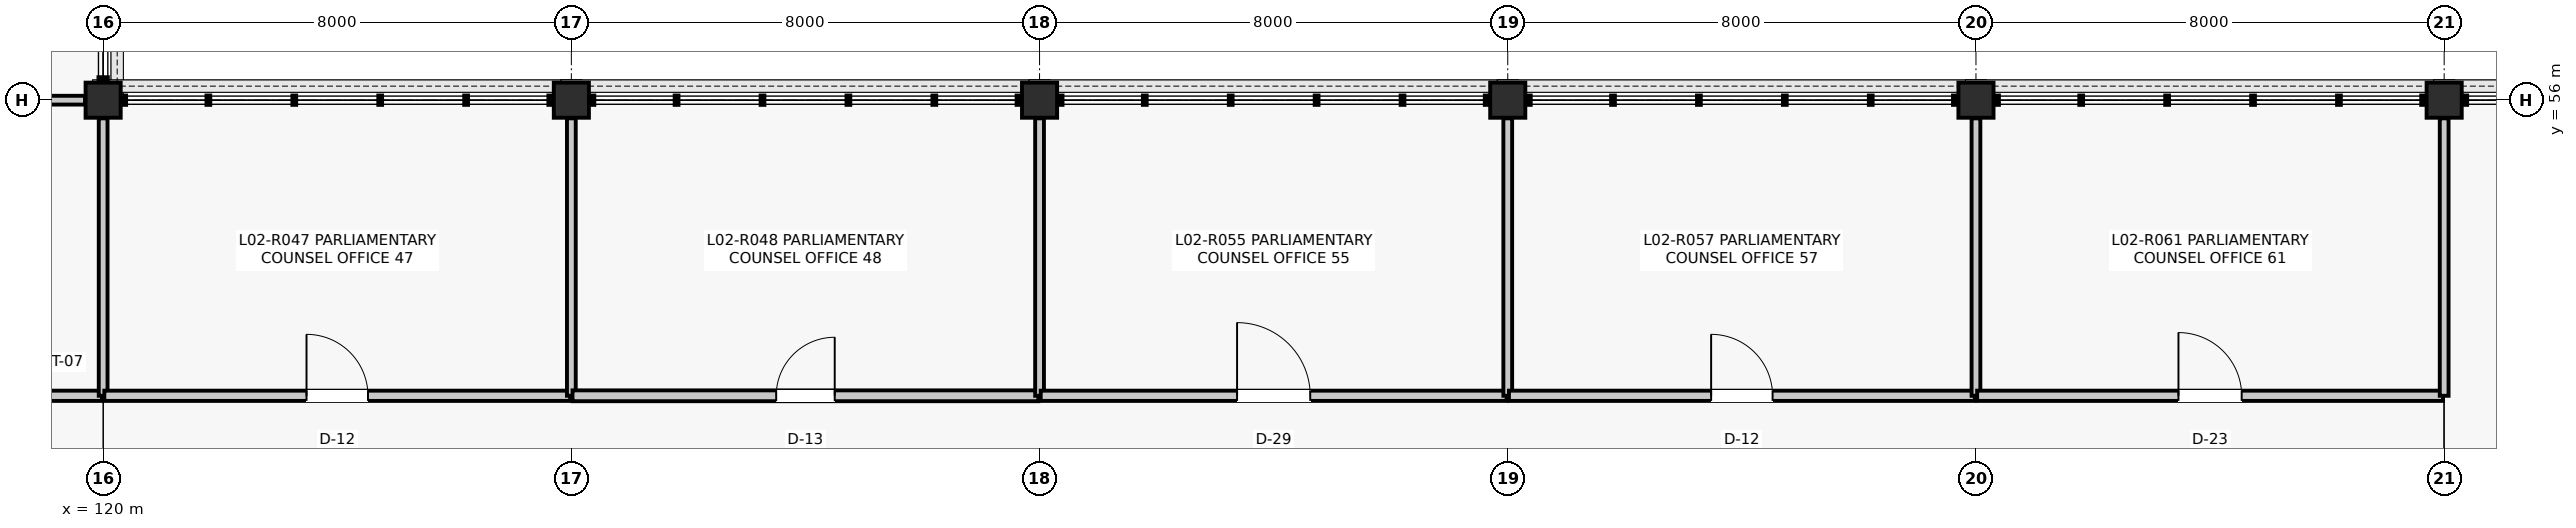
"""IFC4 building model, lengths in metres.
Left out: names, types, materials, properties, quantities, classifications, styles, units other than length and angle.
Written with IfcOpenShell. Run it as: python <this file> out.ifc"""

import sys

from ifc_helpers import new_model, si_unit, direction, frame, frame_2d, origin, origin_2d, place, context, subcontext, project, spatial, rectangle, extrude, element, fill, save


model = new_model("IFC4")
c1 = context("Model", 3, precision=1e-05, world=origin(), true_north=direction((0.0, 1.0)))
c2 = subcontext(c1, "Body", "Model", "MODEL_VIEW")
j1 = project(units=[si_unit("LENGTHUNIT", "METRE"), si_unit("PLANEANGLEUNIT", "RADIAN")], contexts=[c1])
p1 = place(None, origin())
s1 = spatial("IfcSite", under=j1, at=p1, CompositionType="ELEMENT")
p2 = place(p1, origin())
s2 = spatial("IfcBuilding", under=s1, at=p2, CompositionType="ELEMENT")
p3 = place(p2, frame((0.0, 0.0, 9.9)))
s3 = spatial("IfcBuildingStorey", under=s2, at=p3, CompositionType="ELEMENT", Elevation=9.9)
for number, where, z_axis, x_axis in (
    (1, (120.0, 56.0, 0.0), (0.0, 0.0, 1.0), (1.0, 0.0, 0.0)),
    (2, (128.0, 56.0, 0.0), (0.0, 0.0, 1.0), (1.0, 0.0, 0.0)),
    (3, (136.0, 56.0, 0.0), (0.0, 0.0, 1.0), (1.0, 0.0, 0.0)),
    (4, (144.0, 56.0, 0.0), (0.0, 0.0, 1.0), (1.0, 0.0, 0.0)),
    (5, (152.0, 56.0, 0.0), (0.0, 0.0, 1.0), (1.0, 0.0, 0.0)),
    (6, (160.0, 56.0, 0.0), (0.0, 0.0, 1.0), (1.0, 0.0, 0.0)),
):
    element("IfcColumn", number, at=place(p3, frame(where, z_axis=z_axis, x_axis=x_axis)), inside=s3, PredefinedType="COLUMN", context=c2, shape_type="SweptSolid", body=[
        extrude(rectangle(XDim=0.6, YDim=0.6, at=origin_2d()), origin(), (0.0, 0.0, 1.0), 3.96),
    ])
p4 = place(p3, frame((114.9, 50.95, 0.0), z_axis=(0.0, 0.0, 1.0), x_axis=(1.0, 0.0, 0.0)))
e7 = element("IfcWall", 7, at=p4, inside=s3, PredefinedType="PARTITIONING", context=c2, shape_type="SweptSolid", body=[
    extrude(rectangle(XDim=5.08, YDim=0.175, at=frame_2d((2.54, 0.0))), origin(), (0.0, 0.0, 1.0), 3.227),
])
p5 = place(p4, frame((1.915, 0.0, 0.0)))
e8 = element("IfcOpeningElement", 8, at=p5, cuts=e7, PredefinedType="OPENING", context=c2, shape_type="SweptSolid", body=[
    extrude(rectangle(XDim=1.25, YDim=2.18, at=frame_2d((0.625, 1.09))), frame((0.0, 0.097, 0.0), z_axis=(0.0, -1.0, 0.0), x_axis=(1.0, 0.0, 0.0)), (0.0, 0.0, 1.0), 0.195),
])
p6 = place(p3, frame((114.95, 56.0, 0.0), z_axis=(0.0, 0.0, 1.0), x_axis=(1.0, 0.0, 0.0)))
e9 = element("IfcWall", 9, at=p6, inside=s3, PredefinedType="PARTITIONING", context=c2, shape_type="SweptSolid", body=[
    extrude(rectangle(XDim=4.74, YDim=0.15, at=frame_2d((2.37, 0.0))), origin(), (0.0, 0.0, 1.0), 3.157),
])
p7 = place(p3, frame((120.0, 50.95, 0.0), z_axis=(0.0, 0.0, 1.0), x_axis=(0.0, 1.0, 0.0)))
e10 = element("IfcWall", 10, at=p7, inside=s3, PredefinedType="PARTITIONING", context=c2, shape_type="SweptSolid", body=[
    extrude(rectangle(XDim=4.74, YDim=0.15, at=frame_2d((2.37, 0.0))), origin(), (0.0, 0.0, 1.0), 3.227),
])
p8 = place(p3, frame((120.02, 50.95, 0.0), z_axis=(0.0, 0.0, 1.0), x_axis=(1.0, 0.0, 0.0)))
e11 = element("IfcWall", 11, at=p8, inside=s3, PredefinedType="PARTITIONING", context=c2, shape_type="SweptSolid", body=[
    extrude(rectangle(XDim=7.96, YDim=0.175, at=frame_2d((3.98, 0.0))), origin(), (0.0, 0.0, 1.0), 3.151),
])
p9 = place(p8, frame((3.455, 0.0, 0.0)))
e12 = element("IfcOpeningElement", 12, at=p9, cuts=e11, PredefinedType="OPENING", context=c2, shape_type="SweptSolid", body=[
    extrude(rectangle(XDim=1.05, YDim=2.15, at=frame_2d((0.525, 1.075))), frame((0.0, 0.097, 0.0), z_axis=(0.0, -1.0, 0.0), x_axis=(1.0, 0.0, 0.0)), (0.0, 0.0, 1.0), 0.195),
])
p10 = place(p3, frame((128.0, 50.95, 0.0), z_axis=(0.0, 0.0, 1.0), x_axis=(0.0, 1.0, 0.0)))
e13 = element("IfcWall", 13, at=p10, inside=s3, PredefinedType="PARTITIONING", context=c2, shape_type="SweptSolid", body=[
    extrude(rectangle(XDim=4.74, YDim=0.15, at=frame_2d((2.37, 0.0))), origin(), (0.0, 0.0, 1.0), 3.151),
])
p11 = place(p3, frame((128.02, 50.95, 0.0), z_axis=(0.0, 0.0, 1.0), x_axis=(1.0, 0.0, 0.0)))
e14 = element("IfcWall", 14, at=p11, inside=s3, PredefinedType="PARTITIONING", context=c2, shape_type="SweptSolid", body=[
    extrude(rectangle(XDim=7.96, YDim=0.185, at=frame_2d((3.98, 0.0))), origin(), (0.0, 0.0, 1.0), 3.151),
])
p12 = place(p11, frame((3.48, 0.0, 0.0)))
e15 = element("IfcOpeningElement", 15, at=p12, cuts=e14, PredefinedType="OPENING", context=c2, shape_type="SweptSolid", body=[
    extrude(rectangle(XDim=1.0, YDim=2.15, at=frame_2d((0.5, 1.075))), frame((0.0, 0.103, 0.0), z_axis=(0.0, -1.0, 0.0), x_axis=(1.0, 0.0, 0.0)), (0.0, 0.0, 1.0), 0.205),
])
p13 = place(p3, frame((136.0, 50.95, 0.0), z_axis=(0.0, 0.0, 1.0), x_axis=(0.0, 1.0, 0.0)))
e16 = element("IfcWall", 16, at=p13, inside=s3, PredefinedType="PARTITIONING", context=c2, shape_type="SweptSolid", body=[
    extrude(rectangle(XDim=4.74, YDim=0.15, at=frame_2d((2.37, 0.0))), origin(), (0.0, 0.0, 1.0), 3.221),
])
p14 = place(p3, frame((136.02, 50.95, 0.0), z_axis=(0.0, 0.0, 1.0), x_axis=(1.0, 0.0, 0.0)))
e17 = element("IfcWall", 17, at=p14, inside=s3, PredefinedType="PARTITIONING", context=c2, shape_type="SweptSolid", body=[
    extrude(rectangle(XDim=7.96, YDim=0.175, at=frame_2d((3.98, 0.0))), origin(), (0.0, 0.0, 1.0), 3.157),
])
p15 = place(p14, frame((3.355, 0.0, 0.0)))
e18 = element("IfcOpeningElement", 18, at=p15, cuts=e17, PredefinedType="OPENING", context=c2, shape_type="SweptSolid", body=[
    extrude(rectangle(XDim=1.25, YDim=2.18, at=frame_2d((0.625, 1.09))), frame((0.0, 0.097, 0.0), z_axis=(0.0, -1.0, 0.0), x_axis=(1.0, 0.0, 0.0)), (0.0, 0.0, 1.0), 0.195),
])
p16 = place(p3, frame((144.0, 50.95, 0.0), z_axis=(0.0, 0.0, 1.0), x_axis=(0.0, 1.0, 0.0)))
e19 = element("IfcWall", 19, at=p16, inside=s3, PredefinedType="PARTITIONING", context=c2, shape_type="SweptSolid", body=[
    extrude(rectangle(XDim=4.74, YDim=0.15, at=frame_2d((2.37, 0.0))), origin(), (0.0, 0.0, 1.0), 3.157),
])
p17 = place(p3, frame((144.02, 50.95, 0.0), z_axis=(0.0, 0.0, 1.0), x_axis=(1.0, 0.0, 0.0)))
e20 = element("IfcWall", 20, at=p17, inside=s3, PredefinedType="PARTITIONING", context=c2, shape_type="SweptSolid", body=[
    extrude(rectangle(XDim=7.96, YDim=0.175, at=frame_2d((3.98, 0.0))), origin(), (0.0, 0.0, 1.0), 3.157),
])
p18 = place(p17, frame((3.455, 0.0, 0.0)))
e21 = element("IfcOpeningElement", 21, at=p18, cuts=e20, PredefinedType="OPENING", context=c2, shape_type="SweptSolid", body=[
    extrude(rectangle(XDim=1.05, YDim=2.15, at=frame_2d((0.525, 1.075))), frame((0.0, 0.097, 0.0), z_axis=(0.0, -1.0, 0.0), x_axis=(1.0, 0.0, 0.0)), (0.0, 0.0, 1.0), 0.195),
])
p19 = place(p3, frame((152.0, 50.95, 0.0), z_axis=(0.0, 0.0, 1.0), x_axis=(0.0, 1.0, 0.0)))
e22 = element("IfcWall", 22, at=p19, inside=s3, PredefinedType="PARTITIONING", context=c2, shape_type="SweptSolid", body=[
    extrude(rectangle(XDim=4.74, YDim=0.15, at=frame_2d((2.37, 0.0))), origin(), (0.0, 0.0, 1.0), 3.227),
])
p20 = place(p3, frame((152.02, 50.95, 0.0), z_axis=(0.0, 0.0, 1.0), x_axis=(1.0, 0.0, 0.0)))
e23 = element("IfcWall", 23, at=p20, inside=s3, PredefinedType="PARTITIONING", context=c2, shape_type="SweptSolid", body=[
    extrude(rectangle(XDim=7.96, YDim=0.175, at=frame_2d((3.98, 0.0))), origin(), (0.0, 0.0, 1.0), 3.151),
])
p21 = place(p20, frame((3.44, 0.0, 0.0)))
e24 = element("IfcOpeningElement", 24, at=p21, cuts=e23, PredefinedType="OPENING", context=c2, shape_type="SweptSolid", body=[
    extrude(rectangle(XDim=1.08, YDim=2.2, at=frame_2d((0.54, 1.1))), frame((0.0, 0.097, 0.0), z_axis=(0.0, -1.0, 0.0), x_axis=(1.0, 0.0, 0.0)), (0.0, 0.0, 1.0), 0.195),
])
p22 = place(p3, frame((160.0, 50.95, 0.0), z_axis=(0.0, 0.0, 1.0), x_axis=(0.0, 1.0, 0.0)))
e25 = element("IfcWall", 25, at=p22, inside=s3, PredefinedType="PARTITIONING", context=c2, shape_type="SweptSolid", body=[
    extrude(rectangle(XDim=4.74, YDim=0.15, at=frame_2d((2.37, 0.0))), origin(), (0.0, 0.0, 1.0), 3.151),
])
p23 = place(p9, origin())
e26 = element("IfcDoor", 26, at=p23, inside=s3, OperationType="SINGLE_SWING_LEFT", PredefinedType="DOOR", context=c2, shape_type="SweptSolid", body=[
    extrude(rectangle(XDim=1.05, YDim=2.15, at=frame_2d((0.525, 1.075))), frame((0.0, 0.025, 0.0), z_axis=(0.0, -1.0, 0.0), x_axis=(1.0, 0.0, 0.0)), (0.0, 0.0, 1.0), 0.05),
])
fill(e12, e26)
p24 = place(p12, origin())
e27 = element("IfcDoor", 27, at=p24, inside=s3, OperationType="SINGLE_SWING_RIGHT", PredefinedType="DOOR", context=c2, shape_type="SweptSolid", body=[
    extrude(rectangle(XDim=1.0, YDim=2.15, at=frame_2d((0.5, 1.075))), frame((0.0, 0.025, 0.0), z_axis=(0.0, -1.0, 0.0), x_axis=(1.0, 0.0, 0.0)), (0.0, 0.0, 1.0), 0.05),
])
fill(e15, e27)
p25 = place(p15, origin())
e28 = element("IfcDoor", 28, at=p25, inside=s3, OperationType="SINGLE_SWING_LEFT", PredefinedType="DOOR", context=c2, shape_type="SweptSolid", body=[
    extrude(rectangle(XDim=1.25, YDim=2.18, at=frame_2d((0.625, 1.09))), frame((0.0, 0.025, 0.0), z_axis=(0.0, -1.0, 0.0), x_axis=(1.0, 0.0, 0.0)), (0.0, 0.0, 1.0), 0.05),
])
fill(e18, e28)
p26 = place(p18, origin())
e29 = element("IfcDoor", 29, at=p26, inside=s3, OperationType="SINGLE_SWING_LEFT", PredefinedType="DOOR", context=c2, shape_type="SweptSolid", body=[
    extrude(rectangle(XDim=1.05, YDim=2.15, at=frame_2d((0.525, 1.075))), frame((0.0, 0.025, 0.0), z_axis=(0.0, -1.0, 0.0), x_axis=(1.0, 0.0, 0.0)), (0.0, 0.0, 1.0), 0.05),
])
fill(e21, e29)
p27 = place(p21, origin())
e30 = element("IfcDoor", 30, at=p27, inside=s3, OperationType="SINGLE_SWING_LEFT", PredefinedType="DOOR", context=c2, shape_type="SweptSolid", body=[
    extrude(rectangle(XDim=1.08, YDim=2.2, at=frame_2d((0.54, 1.1))), frame((0.0, 0.025, 0.0), z_axis=(0.0, -1.0, 0.0), x_axis=(1.0, 0.0, 0.0)), (0.0, 0.0, 1.0), 0.05),
])
fill(e24, e30)
save(model, sys.argv[1])
